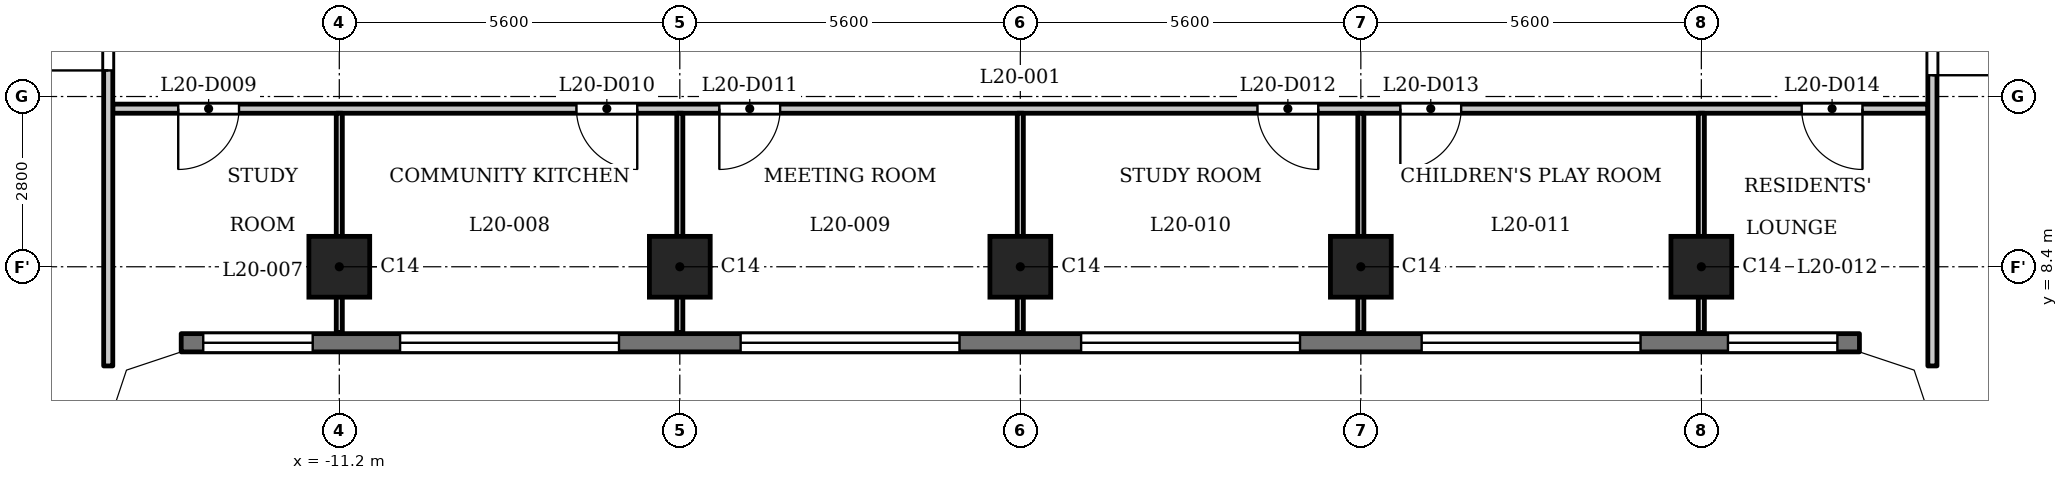
"""IFC4 building model, lengths in metres.
Left out: names, types, materials, properties, quantities, classifications, styles, units other than length and angle.
Written with IfcOpenShell. Run it as: python <this file> out.ifc"""

import sys

from ifc_helpers import new_model, si_unit, direction, frame, frame_2d, origin, origin_2d, place, context, subcontext, project, spatial, polyline, rectangle, outline, extrude, element, fill, save


model = new_model("IFC4")
c1 = context("Model", 3, precision=1e-05, world=origin(), true_north=direction((0.0, 1.0)))
c2 = subcontext(c1, "Body", "Model", "MODEL_VIEW")
j1 = project(units=[si_unit("LENGTHUNIT", "METRE"), si_unit("PLANEANGLEUNIT", "RADIAN")], contexts=[c1])
p1 = place(None, origin())
s1 = spatial("IfcSite", under=j1, at=p1, CompositionType="ELEMENT")
p2 = place(p1, origin())
s2 = spatial("IfcBuilding", under=s1, at=p2, CompositionType="ELEMENT")
p3 = place(p2, frame((0.0, 0.0, 83.3)))
s3 = spatial("IfcBuildingStorey", under=s2, at=p3, CompositionType="ELEMENT", Elevation=83.3)
for number, where, z_axis, x_axis in (
    (1, (-11.2, 8.4, 0.0), (0.0, 0.0, 1.0), (1.0, 0.0, 0.0)),
    (2, (-5.6, 8.4, 0.0), (0.0, 0.0, 1.0), (1.0, 0.0, 0.0)),
    (3, (0.0, 8.4, 0.0), (0.0, 0.0, 1.0), (1.0, 0.0, 0.0)),
    (4, (5.6, 8.4, 0.0), (0.0, 0.0, 1.0), (1.0, 0.0, 0.0)),
    (5, (11.2, 8.4, 0.0), (0.0, 0.0, 1.0), (1.0, 0.0, 0.0)),
):
    element("IfcColumn", number, at=place(p3, frame(where, z_axis=z_axis, x_axis=x_axis)), inside=s3, PredefinedType="COLUMN", context=c2, shape_type="SweptSolid", body=[
        extrude(rectangle(XDim=1.0, YDim=1.0, at=origin_2d()), origin(), (0.0, 0.0, 1.0), 3.5),
    ])
p4 = place(p3, frame((-13.8, 7.15, 0.0), z_axis=(0.0, 0.0, 1.0), x_axis=(1.0, 0.0, 0.0)))
e6 = element("IfcWall", 6, at=p4, inside=s3, PredefinedType="SOLIDWALL", context=c2, shape_type="SweptSolid", body=[
    extrude(rectangle(XDim=27.6, YDim=0.3, at=frame_2d((13.8, 0.0))), origin(), (0.0, 0.0, 1.0), 3.2),
])
p5 = place(p4, frame((0.363, 0.0, 0.9)))
e7 = element("IfcOpeningElement", 7, at=p5, cuts=e6, PredefinedType="OPENING", context=c2, shape_type="SweptSolid", body=[
    extrude(rectangle(XDim=1.8, YDim=1.25, at=frame_2d((0.9, 0.625))), frame((0.0, 0.16, 0.0), z_axis=(0.0, -1.0, 0.0), x_axis=(1.0, 0.0, 0.0)), (0.0, 0.0, 1.0), 0.32),
])
p6 = place(p4, frame((3.6, 0.0, 1.2)))
e8 = element("IfcOpeningElement", 8, at=p6, cuts=e6, PredefinedType="OPENING", context=c2, shape_type="SweptSolid", body=[
    extrude(rectangle(XDim=3.6, YDim=0.95, at=frame_2d((1.8, 0.475))), frame((0.0, 0.16, 0.0), z_axis=(0.0, -1.0, 0.0), x_axis=(1.0, 0.0, 0.0)), (0.0, 0.0, 1.0), 0.32),
])
p7 = place(p4, frame((9.2, 0.0, 1.2)))
e9 = element("IfcOpeningElement", 9, at=p7, cuts=e6, PredefinedType="OPENING", context=c2, shape_type="SweptSolid", body=[
    extrude(rectangle(XDim=3.6, YDim=0.95, at=frame_2d((1.8, 0.475))), frame((0.0, 0.16, 0.0), z_axis=(0.0, -1.0, 0.0), x_axis=(1.0, 0.0, 0.0)), (0.0, 0.0, 1.0), 0.32),
])
p8 = place(p4, frame((14.8, 0.0, 1.2)))
e10 = element("IfcOpeningElement", 10, at=p8, cuts=e6, PredefinedType="OPENING", context=c2, shape_type="SweptSolid", body=[
    extrude(rectangle(XDim=3.6, YDim=0.95, at=frame_2d((1.8, 0.475))), frame((0.0, 0.16, 0.0), z_axis=(0.0, -1.0, 0.0), x_axis=(1.0, 0.0, 0.0)), (0.0, 0.0, 1.0), 0.32),
])
p9 = place(p4, frame((20.4, 0.0, 1.2)))
e11 = element("IfcOpeningElement", 11, at=p9, cuts=e6, PredefinedType="OPENING", context=c2, shape_type="SweptSolid", body=[
    extrude(rectangle(XDim=3.6, YDim=0.95, at=frame_2d((1.8, 0.475))), frame((0.0, 0.16, 0.0), z_axis=(0.0, -1.0, 0.0), x_axis=(1.0, 0.0, 0.0)), (0.0, 0.0, 1.0), 0.32),
])
p10 = place(p4, frame((25.438, 0.0, 0.9)))
e12 = element("IfcOpeningElement", 12, at=p10, cuts=e6, PredefinedType="OPENING", context=c2, shape_type="SweptSolid", body=[
    extrude(rectangle(XDim=1.8, YDim=1.25, at=frame_2d((0.9, 0.625))), frame((0.0, 0.16, 0.0), z_axis=(0.0, -1.0, 0.0), x_axis=(1.0, 0.0, 0.0)), (0.0, 0.0, 1.0), 0.32),
])
p11 = place(p3, frame((-14.925, 11.0, 0.0), z_axis=(0.0, 0.0, 1.0), x_axis=(1.0, 0.0, 0.0)))
e13 = element("IfcWall", 13, at=p11, inside=s3, PredefinedType="PARTITIONING", context=c2, shape_type="SweptSolid", body=[
    extrude(rectangle(XDim=29.85, YDim=0.15, at=frame_2d((14.925, 0.0))), origin(), (0.0, 0.0, 1.0), 3.2),
])
p12 = place(p11, frame((1.076, 0.0, 0.0)))
e14 = element("IfcOpeningElement", 14, at=p12, cuts=e13, PredefinedType="OPENING", context=c2, shape_type="SweptSolid", body=[
    extrude(rectangle(XDim=1.0, YDim=2.1, at=frame_2d((0.5, 1.05))), frame((0.0, 0.085, 0.0), z_axis=(0.0, -1.0, 0.0), x_axis=(1.0, 0.0, 0.0)), (0.0, 0.0, 1.0), 0.17),
])
p13 = place(p11, frame((7.625, 0.0, 0.0)))
e15 = element("IfcOpeningElement", 15, at=p13, cuts=e13, PredefinedType="OPENING", context=c2, shape_type="SweptSolid", body=[
    extrude(rectangle(XDim=1.0, YDim=2.1, at=frame_2d((0.5, 1.05))), frame((0.0, 0.085, 0.0), z_axis=(0.0, -1.0, 0.0), x_axis=(1.0, 0.0, 0.0)), (0.0, 0.0, 1.0), 0.17),
])
p14 = place(p11, frame((9.975, 0.0, 0.0)))
e16 = element("IfcOpeningElement", 16, at=p14, cuts=e13, PredefinedType="OPENING", context=c2, shape_type="SweptSolid", body=[
    extrude(rectangle(XDim=1.0, YDim=2.1, at=frame_2d((0.5, 1.05))), frame((0.0, 0.085, 0.0), z_axis=(0.0, -1.0, 0.0), x_axis=(1.0, 0.0, 0.0)), (0.0, 0.0, 1.0), 0.17),
])
p15 = place(p11, frame((18.825, 0.0, 0.0)))
e17 = element("IfcOpeningElement", 17, at=p15, cuts=e13, PredefinedType="OPENING", context=c2, shape_type="SweptSolid", body=[
    extrude(rectangle(XDim=1.0, YDim=2.1, at=frame_2d((0.5, 1.05))), frame((0.0, 0.085, 0.0), z_axis=(0.0, -1.0, 0.0), x_axis=(1.0, 0.0, 0.0)), (0.0, 0.0, 1.0), 0.17),
])
p16 = place(p11, frame((21.175, 0.0, 0.0)))
e18 = element("IfcOpeningElement", 18, at=p16, cuts=e13, PredefinedType="OPENING", context=c2, shape_type="SweptSolid", body=[
    extrude(rectangle(XDim=1.0, YDim=2.1, at=frame_2d((0.5, 1.05))), frame((0.0, 0.085, 0.0), z_axis=(0.0, -1.0, 0.0), x_axis=(1.0, 0.0, 0.0)), (0.0, 0.0, 1.0), 0.17),
])
p17 = place(p11, frame((27.775, 0.0, 0.0)))
e19 = element("IfcOpeningElement", 19, at=p17, cuts=e13, PredefinedType="OPENING", context=c2, shape_type="SweptSolid", body=[
    extrude(rectangle(XDim=1.0, YDim=2.1, at=frame_2d((0.5, 1.05))), frame((0.0, 0.085, 0.0), z_axis=(0.0, -1.0, 0.0), x_axis=(1.0, 0.0, 0.0)), (0.0, 0.0, 1.0), 0.17),
])
p18 = place(p3, frame((-15.0, 6.769, 0.0), z_axis=(0.0, 0.0, 1.0), x_axis=(0.0, 1.0, 0.0)))
e20 = element("IfcWall", 20, at=p18, inside=s3, PredefinedType="PARTITIONING", context=c2, shape_type="SweptSolid", body=[
    extrude(rectangle(XDim=6.356, YDim=0.15, at=frame_2d((3.178, 0.0))), origin(), (0.0, 0.0, 1.0), 3.2),
])
p19 = place(p18, frame((4.86, 0.0, 0.0)))
e21 = element("IfcOpeningElement", 21, at=p19, cuts=e20, PredefinedType="OPENING", context=c2, shape_type="SweptSolid", body=[
    extrude(rectangle(XDim=1.0, YDim=2.1, at=frame_2d((0.5, 1.05))), frame((0.0, 0.085, 0.0), z_axis=(0.0, -1.0, 0.0), x_axis=(1.0, 0.0, 0.0)), (0.0, 0.0, 1.0), 0.17),
])
for number, where, z_axis, x_axis in (
    (22, (-11.2, 7.32, 0.0), (0.0, 0.0, 1.0), (0.0, 1.0, 0.0)),
    (23, (-5.6, 7.32, 0.0), (0.0, 0.0, 1.0), (0.0, 1.0, 0.0)),
    (24, (0.0, 7.32, 0.0), (0.0, 0.0, 1.0), (0.0, 1.0, 0.0)),
    (25, (5.6, 7.32, 0.0), (0.0, 0.0, 1.0), (0.0, 1.0, 0.0)),
    (26, (11.2, 7.32, 0.0), (0.0, 0.0, 1.0), (0.0, 1.0, 0.0)),
):
    element("IfcWall", number, at=place(p3, frame(where, z_axis=z_axis, x_axis=x_axis)), inside=s3, PredefinedType="PARTITIONING", context=c2, shape_type="SweptSolid", body=[
        extrude(rectangle(XDim=3.605, YDim=0.1, at=frame_2d((1.802, 0.0))), origin(), (0.0, 0.0, 1.0), 3.2),
    ])
p20 = place(p3, frame((15.0, 6.769, 0.0), z_axis=(0.0, 0.0, 1.0), x_axis=(0.0, 1.0, 0.0)))
e27 = element("IfcWall", 27, at=p20, inside=s3, PredefinedType="PARTITIONING", context=c2, shape_type="SweptSolid", body=[
    extrude(rectangle(XDim=6.356, YDim=0.15, at=frame_2d((3.178, 0.0))), origin(), (0.0, 0.0, 1.0), 3.2),
])
p21 = place(p20, frame((4.781, 0.0, 0.0)))
e28 = element("IfcOpeningElement", 28, at=p21, cuts=e27, PredefinedType="OPENING", context=c2, shape_type="SweptSolid", body=[
    extrude(rectangle(XDim=1.0, YDim=2.1, at=frame_2d((0.5, 1.05))), frame((0.0, 0.085, 0.0), z_axis=(0.0, -1.0, 0.0), x_axis=(1.0, 0.0, 0.0)), (0.0, 0.0, 1.0), 0.17),
])
p22 = place(p3, origin())
e29 = element("IfcWall", 29, at=p22, inside=s3, PredefinedType="SOLIDWALL", context=c2, shape_type="SweptSolid", body=[
    extrude(outline(polyline([(-13.849, 7.3), (-14.937, 6.937), (-15.3, 5.849), (-15.3, 5.8), (-15.0, 5.8), (-14.7, 6.7), (-13.8, 7.0), (-13.8, 7.3), (-13.849, 7.3)])), origin(), (0.0, 0.0, 1.0), 3.2),
])
e30 = element("IfcWall", 30, at=p22, inside=s3, PredefinedType="SOLIDWALL", context=c2, shape_type="SweptSolid", body=[
    extrude(outline(polyline([(14.937, 6.937), (13.849, 7.3), (13.8, 7.3), (13.8, 7.0), (14.7, 6.7), (15.0, 5.8), (15.3, 5.8), (15.3, 5.849), (14.937, 6.937)])), origin(), (0.0, 0.0, 1.0), 3.2),
])
p23 = place(p19, origin())
e31 = element("IfcDoor", 31, at=p23, inside=s3, OperationType="SINGLE_SWING_RIGHT", PredefinedType="DOOR", context=c2, shape_type="SweptSolid", body=[
    extrude(rectangle(XDim=1.0, YDim=2.1, at=frame_2d((0.5, 1.05))), frame((0.0, 0.025, 0.0), z_axis=(0.0, -1.0, 0.0), x_axis=(1.0, 0.0, 0.0)), (0.0, 0.0, 1.0), 0.05),
])
fill(e21, e31)
p24 = place(p21, origin())
e32 = element("IfcDoor", 32, at=p24, inside=s3, OperationType="SINGLE_SWING_LEFT", PredefinedType="DOOR", context=c2, shape_type="SweptSolid", body=[
    extrude(rectangle(XDim=1.0, YDim=2.1, at=frame_2d((0.5, 1.05))), frame((0.0, 0.025, 0.0), z_axis=(0.0, -1.0, 0.0), x_axis=(1.0, 0.0, 0.0)), (0.0, 0.0, 1.0), 0.05),
])
fill(e28, e32)
p25 = place(p12, origin())
e33 = element("IfcDoor", 33, at=p25, inside=s3, OperationType="SINGLE_SWING_LEFT", PredefinedType="DOOR", context=c2, shape_type="SweptSolid", body=[
    extrude(rectangle(XDim=1.0, YDim=2.1, at=frame_2d((0.5, 1.05))), frame((0.0, 0.025, 0.0), z_axis=(0.0, -1.0, 0.0), x_axis=(1.0, 0.0, 0.0)), (0.0, 0.0, 1.0), 0.05),
])
fill(e14, e33)
p26 = place(p13, origin())
e34 = element("IfcDoor", 34, at=p26, inside=s3, OperationType="SINGLE_SWING_RIGHT", PredefinedType="DOOR", context=c2, shape_type="SweptSolid", body=[
    extrude(rectangle(XDim=1.0, YDim=2.1, at=frame_2d((0.5, 1.05))), frame((0.0, 0.025, 0.0), z_axis=(0.0, -1.0, 0.0), x_axis=(1.0, 0.0, 0.0)), (0.0, 0.0, 1.0), 0.05),
])
fill(e15, e34)
p27 = place(p14, origin())
e35 = element("IfcDoor", 35, at=p27, inside=s3, OperationType="SINGLE_SWING_LEFT", PredefinedType="DOOR", context=c2, shape_type="SweptSolid", body=[
    extrude(rectangle(XDim=1.0, YDim=2.1, at=frame_2d((0.5, 1.05))), frame((0.0, 0.025, 0.0), z_axis=(0.0, -1.0, 0.0), x_axis=(1.0, 0.0, 0.0)), (0.0, 0.0, 1.0), 0.05),
])
fill(e16, e35)
p28 = place(p15, origin())
e36 = element("IfcDoor", 36, at=p28, inside=s3, OperationType="SINGLE_SWING_RIGHT", PredefinedType="DOOR", context=c2, shape_type="SweptSolid", body=[
    extrude(rectangle(XDim=1.0, YDim=2.1, at=frame_2d((0.5, 1.05))), frame((0.0, 0.025, 0.0), z_axis=(0.0, -1.0, 0.0), x_axis=(1.0, 0.0, 0.0)), (0.0, 0.0, 1.0), 0.05),
])
fill(e17, e36)
p29 = place(p16, origin())
e37 = element("IfcDoor", 37, at=p29, inside=s3, OperationType="SINGLE_SWING_LEFT", PredefinedType="DOOR", context=c2, shape_type="SweptSolid", body=[
    extrude(rectangle(XDim=1.0, YDim=2.1, at=frame_2d((0.5, 1.05))), frame((0.0, 0.025, 0.0), z_axis=(0.0, -1.0, 0.0), x_axis=(1.0, 0.0, 0.0)), (0.0, 0.0, 1.0), 0.05),
])
fill(e18, e37)
p30 = place(p17, origin())
e38 = element("IfcDoor", 38, at=p30, inside=s3, OperationType="SINGLE_SWING_RIGHT", PredefinedType="DOOR", context=c2, shape_type="SweptSolid", body=[
    extrude(rectangle(XDim=1.0, YDim=2.1, at=frame_2d((0.5, 1.05))), frame((0.0, 0.025, 0.0), z_axis=(0.0, -1.0, 0.0), x_axis=(1.0, 0.0, 0.0)), (0.0, 0.0, 1.0), 0.05),
])
fill(e19, e38)
p31 = place(p5, origin())
e39 = element("IfcWindow", 39, at=p31, inside=s3, PartitioningType="SINGLE_PANEL", PredefinedType="WINDOW", context=c2, shape_type="SweptSolid", body=[
    extrude(rectangle(XDim=1.8, YDim=1.25, at=frame_2d((0.9, 0.625))), frame((0.0, 0.03, 0.0), z_axis=(0.0, -1.0, 0.0), x_axis=(1.0, 0.0, 0.0)), (0.0, 0.0, 1.0), 0.06),
])
fill(e7, e39)
p32 = place(p6, origin())
e40 = element("IfcWindow", 40, at=p32, inside=s3, PartitioningType="SINGLE_PANEL", PredefinedType="WINDOW", context=c2, shape_type="SweptSolid", body=[
    extrude(rectangle(XDim=3.6, YDim=0.95, at=frame_2d((1.8, 0.475))), frame((0.0, 0.03, 0.0), z_axis=(0.0, -1.0, 0.0), x_axis=(1.0, 0.0, 0.0)), (0.0, 0.0, 1.0), 0.06),
])
fill(e8, e40)
p33 = place(p7, origin())
e41 = element("IfcWindow", 41, at=p33, inside=s3, PartitioningType="SINGLE_PANEL", PredefinedType="WINDOW", context=c2, shape_type="SweptSolid", body=[
    extrude(rectangle(XDim=3.6, YDim=0.95, at=frame_2d((1.8, 0.475))), frame((0.0, 0.03, 0.0), z_axis=(0.0, -1.0, 0.0), x_axis=(1.0, 0.0, 0.0)), (0.0, 0.0, 1.0), 0.06),
])
fill(e9, e41)
p34 = place(p8, origin())
e42 = element("IfcWindow", 42, at=p34, inside=s3, PartitioningType="SINGLE_PANEL", PredefinedType="WINDOW", context=c2, shape_type="SweptSolid", body=[
    extrude(rectangle(XDim=3.6, YDim=0.95, at=frame_2d((1.8, 0.475))), frame((0.0, 0.03, 0.0), z_axis=(0.0, -1.0, 0.0), x_axis=(1.0, 0.0, 0.0)), (0.0, 0.0, 1.0), 0.06),
])
fill(e10, e42)
p35 = place(p9, origin())
e43 = element("IfcWindow", 43, at=p35, inside=s3, PartitioningType="SINGLE_PANEL", PredefinedType="WINDOW", context=c2, shape_type="SweptSolid", body=[
    extrude(rectangle(XDim=3.6, YDim=0.95, at=frame_2d((1.8, 0.475))), frame((0.0, 0.03, 0.0), z_axis=(0.0, -1.0, 0.0), x_axis=(1.0, 0.0, 0.0)), (0.0, 0.0, 1.0), 0.06),
])
fill(e11, e43)
p36 = place(p10, origin())
e44 = element("IfcWindow", 44, at=p36, inside=s3, PartitioningType="SINGLE_PANEL", PredefinedType="WINDOW", context=c2, shape_type="SweptSolid", body=[
    extrude(rectangle(XDim=1.8, YDim=1.25, at=frame_2d((0.9, 0.625))), frame((0.0, 0.03, 0.0), z_axis=(0.0, -1.0, 0.0), x_axis=(1.0, 0.0, 0.0)), (0.0, 0.0, 1.0), 0.06),
])
fill(e12, e44)
save(model, sys.argv[1])
